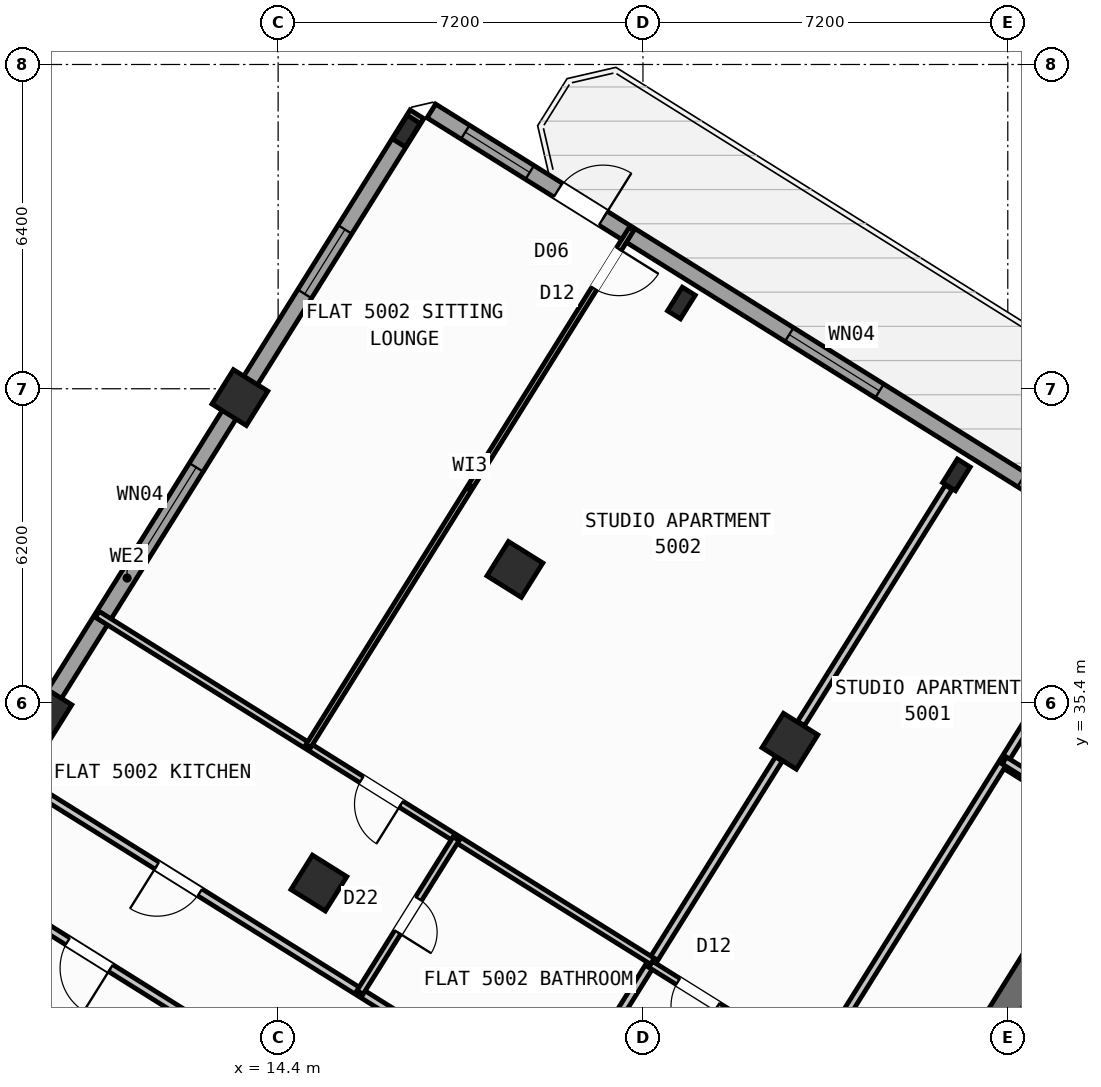
"""IFC4 building model, lengths in metres.
Left out: names, types, materials, properties, quantities, classifications, styles, units other than length and angle.
Written with IfcOpenShell. Run it as: python <this file> out.ifc"""

import sys

from ifc_helpers import new_model, si_unit, direction, frame, frame_2d, origin, origin_2d, place, context, subcontext, project, spatial, rectangle, hollow_rectangle, i_section, extrude, source, transform, mapped, element, fill, save


model = new_model("IFC4")
c1 = context("Model", 3, precision=1e-05, world=origin(), true_north=direction((0.0, 1.0)))
c2 = subcontext(c1, "Body", "Model", "MODEL_VIEW")
j1 = project(units=[si_unit("LENGTHUNIT", "METRE"), si_unit("PLANEANGLEUNIT", "RADIAN")], contexts=[c1])
p1 = place(None, origin())
s1 = spatial("IfcSite", under=j1, at=p1, CompositionType="ELEMENT")
p2 = place(p1, origin())
s2 = spatial("IfcBuilding", under=s1, at=p2, CompositionType="ELEMENT")
p3 = place(p2, frame((0.0, 0.0, 199.5)))
s3 = spatial("IfcBuildingStorey", under=s2, at=p3, CompositionType="ELEMENT", Elevation=199.5)
p4 = place(p3, frame((29.517, 30.594, 0.0), z_axis=(0.0, 0.0, 1.0), x_axis=(-0.529906864564, -0.848055844204, 0.0)))
e1 = element("IfcWall", 1, at=p4, inside=s3, PredefinedType="SHEAR", context=c2, shape_type="SweptSolid", body=[
    extrude(rectangle(XDim=3.575, YDim=0.55, at=frame_2d((1.788, 0.0))), origin(), (0.0, 0.0, 1.0), 4.25),
])
m1 = source(origin(), c2, "Body", "SweptSolid", [
    extrude(i_section(OverallWidth=0.3, OverallDepth=0.55, WebThickness=0.015, FlangeThickness=0.029, at=origin_2d()), origin(), (0.0, 0.0, 1.0), 4.5),
])
p5 = place(p3, frame((27.786, 39.901, 0.0), z_axis=(0.0, 0.0, 1.0), x_axis=(-0.848048096156, 0.529919264233, 0.0)))
e2 = element("IfcColumn", 2, at=p5, inside=s3, PredefinedType="COLUMN", context=c2, shape_type="MappedRepresentation", body=[
    mapped(m1, transform((0.0, 0.0, 0.0), scale=1.0)),
])
m2 = source(origin(), c2, "Body", "SweptSolid", [
    extrude(hollow_rectangle(XDim=0.8, YDim=0.8, WallThickness=0.032, at=origin_2d()), origin(), (0.0, 0.0, 1.0), 4.5),
])
p6 = place(p3, frame((24.5, 34.643, 0.0), z_axis=(0.0, 0.0, 1.0), x_axis=(-0.848048096156, 0.529919264233, 0.0)))
e3 = element("IfcColumn", 3, at=p6, inside=s3, PredefinedType="COLUMN", context=c2, shape_type="MappedRepresentation", body=[
    mapped(m2, transform((0.0, 0.0, 0.0), scale=1.0)),
])
p7 = place(p3, frame((22.358, 43.292, 0.0), z_axis=(0.0, 0.0, 1.0), x_axis=(-0.848048096156, 0.529919264233, 0.0)))
e4 = element("IfcColumn", 4, at=p7, inside=s3, PredefinedType="COLUMN", context=c2, shape_type="MappedRepresentation", body=[
    mapped(m1, transform((0.0, 0.0, 0.0), scale=1.0)),
])
for number, where, z_axis, x_axis in (
    (5, (19.073, 38.034, 0.0), (0.0, 0.0, 1.0), (-0.848, 0.53, 0.0)),
    (6, (15.205, 31.844, 0.0), (0.0, 0.0, 1.0), (-0.848, 0.53, 0.0)),
):
    element("IfcColumn", number, at=place(p3, frame(where, z_axis=z_axis, x_axis=x_axis)), inside=s3, PredefinedType="COLUMN", context=c2, shape_type="MappedRepresentation", body=[
        mapped(m2, transform((0.0, 0.0, 0.0), scale=1.0)),
    ])
p8 = place(p3, frame((16.931, 46.684, 0.0), z_axis=(0.0, 0.0, 1.0), x_axis=(-0.848048096156, 0.529919264233, 0.0)))
e7 = element("IfcColumn", 7, at=p8, inside=s3, PredefinedType="COLUMN", context=c2, shape_type="MappedRepresentation", body=[
    mapped(m1, transform((0.0, 0.0, 0.0), scale=1.0)),
])
for number, where, z_axis, x_axis in (
    (8, (13.646, 41.426, 0.0), (0.0, 0.0, 1.0), (-0.848, 0.53, 0.0)),
    (9, (9.777, 35.235, 0.0), (0.0, 0.0, 1.0), (-0.848, 0.53, 0.0)),
):
    element("IfcColumn", number, at=place(p3, frame(where, z_axis=z_axis, x_axis=x_axis)), inside=s3, PredefinedType="COLUMN", context=c2, shape_type="MappedRepresentation", body=[
        mapped(m2, transform((0.0, 0.0, 0.0), scale=1.0)),
    ])
p9 = place(p3, frame((5.7, 28.71, 0.0), z_axis=(0.0, 0.0, 1.0), x_axis=(0.529923711467, 0.8480453172, 0.0)))
e10 = element("IfcWall", 10, at=p9, inside=s3, PredefinedType="STANDARD", context=c2, shape_type="SweptSolid", body=[
    extrude(rectangle(XDim=21.587, YDim=0.32, at=frame_2d((10.794, 0.0))), origin(), (0.0, 0.0, 1.0), 3.725),
])
p10 = place(p9, frame((1.604, 0.0, 0.85)))
e11 = element("IfcOpeningElement", 11, at=p10, cuts=e10, PredefinedType="OPENING", context=c2, shape_type="SweptSolid", body=[
    extrude(rectangle(XDim=1.5, YDim=1.5, at=frame_2d((0.75, 0.75))), frame((0.0, 0.17, 0.0), z_axis=(0.0, -1.0, 0.0), x_axis=(1.0, 0.0, 0.0)), (0.0, 0.0, 1.0), 0.34),
])
p11 = place(p9, frame((11.269, 0.0, 0.8)))
e12 = element("IfcOpeningElement", 12, at=p11, cuts=e10, PredefinedType="OPENING", context=c2, shape_type="SweptSolid", body=[
    extrude(rectangle(XDim=2.1, YDim=1.55, at=frame_2d((1.05, 0.775))), frame((0.0, 0.17, 0.0), z_axis=(0.0, -1.0, 0.0), x_axis=(1.0, 0.0, 0.0)), (0.0, 0.0, 1.0), 0.34),
])
p12 = place(p9, frame((17.406, 0.0, 0.85)))
e13 = element("IfcOpeningElement", 13, at=p12, cuts=e10, PredefinedType="OPENING", context=c2, shape_type="SweptSolid", body=[
    extrude(rectangle(XDim=1.5, YDim=1.5, at=frame_2d((0.75, 0.75))), frame((0.0, 0.17, 0.0), z_axis=(0.0, -1.0, 0.0), x_axis=(1.0, 0.0, 0.0)), (0.0, 0.0, 1.0), 0.34),
])
p13 = place(p3, frame((17.424, 47.083, 0.0), z_axis=(0.0, 0.0, 1.0), x_axis=(0.848049927979, -0.529916332693, 0.0)))
e14 = element("IfcWall", 14, at=p13, inside=s3, PredefinedType="STANDARD", context=c2, shape_type="SweptSolid", body=[
    extrude(rectangle(XDim=29.223, YDim=0.32, at=frame_2d((14.612, 0.0))), origin(), (0.0, 0.0, 1.0), 4.25),
])
p14 = place(p13, frame((2.949, 0.0, 0.0)))
e15 = element("IfcOpeningElement", 15, at=p14, cuts=e14, PredefinedType="OPENING", context=c2, shape_type="SweptSolid", body=[
    extrude(rectangle(XDim=1.05, YDim=2.15, at=frame_2d((0.525, 1.075))), frame((0.0, 0.17, 0.0), z_axis=(0.0, -1.0, 0.0), x_axis=(1.0, 0.0, 0.0)), (0.0, 0.0, 1.0), 0.34),
])
p15 = place(p13, frame((0.789, 0.0, 0.85)))
e16 = element("IfcOpeningElement", 16, at=p15, cuts=e14, PredefinedType="OPENING", context=c2, shape_type="SweptSolid", body=[
    extrude(rectangle(XDim=1.5, YDim=1.5, at=frame_2d((0.75, 0.75))), frame((0.0, 0.17, 0.0), z_axis=(0.0, -1.0, 0.0), x_axis=(1.0, 0.0, 0.0)), (0.0, 0.0, 1.0), 0.34),
])
p16 = place(p13, frame((8.329, 0.0, 0.8)))
e17 = element("IfcOpeningElement", 17, at=p16, cuts=e14, PredefinedType="OPENING", context=c2, shape_type="SweptSolid", body=[
    extrude(rectangle(XDim=2.1, YDim=1.55, at=frame_2d((1.05, 0.775))), frame((0.0, 0.17, 0.0), z_axis=(0.0, -1.0, 0.0), x_axis=(1.0, 0.0, 0.0)), (0.0, 0.0, 1.0), 0.34),
])
p17 = place(p13, frame((13.739, 0.0, 0.85)))
e18 = element("IfcOpeningElement", 18, at=p17, cuts=e14, PredefinedType="OPENING", context=c2, shape_type="SweptSolid", body=[
    extrude(rectangle(XDim=1.5, YDim=1.5, at=frame_2d((0.75, 0.75))), frame((0.0, 0.17, 0.0), z_axis=(0.0, -1.0, 0.0), x_axis=(1.0, 0.0, 0.0)), (0.0, 0.0, 1.0), 0.34),
])
p18 = place(p13, frame((21.114, 0.0, 0.65)))
e19 = element("IfcOpeningElement", 19, at=p18, cuts=e14, PredefinedType="OPENING", context=c2, shape_type="SweptSolid", body=[
    extrude(rectangle(XDim=2.8, YDim=2.1, at=frame_2d((1.4, 1.05))), frame((0.0, 0.17, 0.0), z_axis=(0.0, -1.0, 0.0), x_axis=(1.0, 0.0, 0.0)), (0.0, 0.0, 1.0), 0.34),
])
p19 = place(p13, frame((26.784, 0.0, 0.85)))
e20 = element("IfcOpeningElement", 20, at=p19, cuts=e14, PredefinedType="OPENING", context=c2, shape_type="SweptSolid", body=[
    extrude(rectangle(XDim=1.5, YDim=1.5, at=frame_2d((0.75, 0.75))), frame((0.0, 0.17, 0.0), z_axis=(0.0, -1.0, 0.0), x_axis=(1.0, 0.0, 0.0)), (0.0, 0.0, 1.0), 0.34),
])
p20 = place(p3, frame((30.914, 32.829, 0.0), z_axis=(0.0, 0.0, 1.0), x_axis=(-0.848008813643, 0.529982124211, 0.0)))
e21 = element("IfcWall", 21, at=p20, inside=s3, PredefinedType="PARTITIONING", context=c2, shape_type="SweptSolid", body=[
    extrude(rectangle(XDim=2.61, YDim=0.16, at=frame_2d((1.305, 0.0))), origin(), (0.0, 0.0, 1.0), 4.24),
])
p21 = place(p3, frame((31.239, 38.274, 0.0), z_axis=(0.0, 0.0, 1.0), x_axis=(-0.529918877109, -0.848048338059, 0.0)))
e22 = element("IfcWall", 22, at=p21, inside=s3, PredefinedType="PARTITIONING", context=c2, shape_type="SweptSolid", body=[
    extrude(rectangle(XDim=15.35, YDim=0.16, at=frame_2d((7.675, 0.0))), origin(), (0.0, 0.0, 1.0), 4.24),
])
p22 = place(p3, frame((23.104, 25.256, 0.0), z_axis=(0.0, 0.0, 1.0), x_axis=(-0.848041752158, 0.529929416617, 0.0)))
e23 = element("IfcWall", 23, at=p22, inside=s3, PredefinedType="PARTITIONING", context=c2, shape_type="SweptSolid", body=[
    extrude(rectangle(XDim=16.73, YDim=0.16, at=frame_2d((8.365, 0.0))), origin(), (0.0, 0.0, 1.0), 4.24),
])
p23 = place(p22, frame((2.22, 0.0, 0.0)))
e24 = element("IfcOpeningElement", 24, at=p23, cuts=e23, PredefinedType="OPENING", context=c2, shape_type="SweptSolid", body=[
    extrude(rectangle(XDim=0.86, YDim=2.05, at=frame_2d((0.43, 1.025))), frame((0.0, 0.09, 0.0), z_axis=(0.0, -1.0, 0.0), x_axis=(1.0, 0.0, 0.0)), (0.0, 0.0, 1.0), 0.18),
])
p24 = place(p22, frame((12.084, 0.0, 0.0)))
e25 = element("IfcOpeningElement", 25, at=p24, cuts=e23, PredefinedType="OPENING", context=c2, shape_type="SweptSolid", body=[
    extrude(rectangle(XDim=1.0, YDim=2.1, at=frame_2d((0.5, 1.05))), frame((0.0, 0.09, 0.0), z_axis=(0.0, -1.0, 0.0), x_axis=(1.0, 0.0, 0.0)), (0.0, 0.0, 1.0), 0.18),
])
p25 = place(p3, frame((21.938, 23.391, 0.0), z_axis=(0.0, 0.0, 1.0), x_axis=(-0.848045850158, 0.529922858565, 0.0)))
e26 = element("IfcWall", 26, at=p25, inside=s3, PredefinedType="PARTITIONING", context=c2, shape_type="SweptSolid", body=[
    extrude(rectangle(XDim=16.73, YDim=0.16, at=frame_2d((8.365, 0.0))), origin(), (0.0, 0.0, 1.0), 4.24),
])
p26 = place(p25, frame((1.505, 0.0, 0.0)))
e27 = element("IfcOpeningElement", 27, at=p26, cuts=e26, PredefinedType="OPENING", context=c2, shape_type="SweptSolid", body=[
    extrude(rectangle(XDim=1.0, YDim=2.1, at=frame_2d((0.5, 1.05))), frame((0.0, 0.09, 0.0), z_axis=(0.0, -1.0, 0.0), x_axis=(1.0, 0.0, 0.0)), (0.0, 0.0, 1.0), 0.18),
])
p27 = place(p25, frame((6.435, 0.0, 0.0)))
e28 = element("IfcOpeningElement", 28, at=p27, cuts=e26, PredefinedType="OPENING", context=c2, shape_type="SweptSolid", body=[
    extrude(rectangle(XDim=1.0, YDim=2.1, at=frame_2d((0.5, 1.05))), frame((0.0, 0.09, 0.0), z_axis=(0.0, -1.0, 0.0), x_axis=(1.0, 0.0, 0.0)), (0.0, 0.0, 1.0), 0.18),
])
p28 = place(p25, frame((12.784, 0.0, 0.0)))
e29 = element("IfcOpeningElement", 29, at=p28, cuts=e26, PredefinedType="OPENING", context=c2, shape_type="SweptSolid", body=[
    extrude(rectangle(XDim=1.0, YDim=2.1, at=frame_2d((0.5, 1.05))), frame((0.0, 0.09, 0.0), z_axis=(0.0, -1.0, 0.0), x_axis=(1.0, 0.0, 0.0)), (0.0, 0.0, 1.0), 0.18),
])
p29 = place(p3, frame((27.634, 39.657, 0.0), z_axis=(0.0, 0.0, 1.0), x_axis=(-0.529899205623, -0.848060629837, 0.0)))
e30 = element("IfcWall", 30, at=p29, inside=s3, PredefinedType="PARTITIONING", context=c2, shape_type="SweptSolid", body=[
    extrude(rectangle(XDim=5.501, YDim=0.16, at=frame_2d((2.75, 0.0))), origin(), (0.0, 0.0, 1.0), 3.725),
])
p30 = place(p3, frame((24.282, 34.293, 0.0), z_axis=(0.0, 0.0, 1.0), x_axis=(-0.529934553702, -0.848038542045, 0.0)))
e31 = element("IfcWall", 31, at=p30, inside=s3, PredefinedType="PARTITIONING", context=c2, shape_type="SweptSolid", body=[
    extrude(rectangle(XDim=6.476, YDim=0.16, at=frame_2d((3.238, 0.0))), origin(), (0.0, 0.0, 1.0), 3.725),
])
p31 = place(p3, frame((24.964, 28.233, 0.0), z_axis=(0.0, 0.0, 1.0), x_axis=(-0.848059820872, 0.529900500304, 0.0)))
e32 = element("IfcWall", 32, at=p31, inside=s3, PredefinedType="PLUMBINGWALL", context=c2, shape_type="SweptSolid", body=[
    extrude(rectangle(XDim=3.79, YDim=0.14, at=frame_2d((1.895, 0.0))), origin(), (0.0, 0.0, 1.0), 4.24),
])
p32 = place(p31, frame((2.23, 0.0, 0.0)))
e33 = element("IfcOpeningElement", 33, at=p32, cuts=e32, PredefinedType="OPENING", context=c2, shape_type="SweptSolid", body=[
    extrude(rectangle(XDim=0.92, YDim=2.08, at=frame_2d((0.46, 1.04))), frame((0.0, 0.08, 0.0), z_axis=(0.0, -1.0, 0.0), x_axis=(1.0, 0.0, 0.0)), (0.0, 0.0, 1.0), 0.16),
])
p33 = place(p3, frame((21.787, 30.301, 0.0), z_axis=(0.0, 0.0, 1.0), x_axis=(-0.848043949058, 0.52992590092, 0.0)))
e34 = element("IfcWall", 34, at=p33, inside=s3, PredefinedType="PLUMBINGWALL", context=c2, shape_type="SweptSolid", body=[
    extrude(rectangle(XDim=12.92, YDim=0.14, at=frame_2d((6.46, 0.0))), origin(), (0.0, 0.0, 1.0), 4.24),
])
p34 = place(p33, frame((5.849, 0.0, 0.0)))
e35 = element("IfcOpeningElement", 35, at=p34, cuts=e34, PredefinedType="OPENING", context=c2, shape_type="SweptSolid", body=[
    extrude(rectangle(XDim=0.92, YDim=2.08, at=frame_2d((0.46, 1.04))), frame((0.0, 0.08, 0.0), z_axis=(0.0, -1.0, 0.0), x_axis=(1.0, 0.0, 0.0)), (0.0, 0.0, 1.0), 0.16),
])
p35 = place(p3, frame((17.913, 32.721, 0.0), z_axis=(0.0, 0.0, 1.0), x_axis=(-0.529906983049, -0.848055770169, 0.0)))
e36 = element("IfcWall", 36, at=p35, inside=s3, PredefinedType="PLUMBINGWALL", context=c2, shape_type="SweptSolid", body=[
    extrude(rectangle(XDim=3.58, YDim=0.14, at=frame_2d((1.79, 0.0))), origin(), (0.0, 0.0, 1.0), 4.24),
])
p36 = place(p35, frame((1.4, 0.0, 0.0)))
e37 = element("IfcOpeningElement", 37, at=p36, cuts=e36, PredefinedType="OPENING", context=c2, shape_type="SweptSolid", body=[
    extrude(rectangle(XDim=0.78, YDim=2.05, at=frame_2d((0.39, 1.025))), frame((0.0, 0.08, 0.0), z_axis=(0.0, -1.0, 0.0), x_axis=(1.0, 0.0, 0.0)), (0.0, 0.0, 1.0), 0.16),
])
p37 = place(p3, frame((21.375, 44.756, 0.0), z_axis=(0.0, 0.0, 1.0), x_axis=(-0.529905980331, -0.848056396715, 0.0)))
e38 = element("IfcWall", 38, at=p37, inside=s3, PredefinedType="PARTITIONING", context=c2, shape_type="SweptSolid", body=[
    extrude(rectangle(XDim=12.04, YDim=0.11, at=frame_2d((6.02, 0.0))), origin(), (0.0, 0.0, 1.0), 4.24),
])
p38 = place(p37, frame((0.47, 0.0, 0.0)))
e39 = element("IfcOpeningElement", 39, at=p38, cuts=e38, PredefinedType="OPENING", context=c2, shape_type="SweptSolid", body=[
    extrude(rectangle(XDim=0.92, YDim=2.08, at=frame_2d((0.46, 1.04))), frame((0.0, 0.065, 0.0), z_axis=(0.0, -1.0, 0.0), x_axis=(1.0, 0.0, 0.0)), (0.0, 0.0, 1.0), 0.13),
])
p39 = place(p3, frame((41.936, 26.012, 0.0), z_axis=(0.0, 0.0, 1.0), x_axis=(-0.848051154596, 0.529914369676, 0.0)))
e40 = element("IfcWall", 40, at=p39, inside=s3, PredefinedType="PARTITIONING", context=c2, shape_type="SweptSolid", body=[
    extrude(rectangle(XDim=15.57, YDim=0.16, at=frame_2d((7.785, 0.0))), origin(), (0.0, 0.0, 1.0), 4.24),
])
p40 = place(p39, frame((4.1, 0.0, 0.0)))
e41 = element("IfcOpeningElement", 41, at=p40, cuts=e40, PredefinedType="OPENING", context=c2, shape_type="SweptSolid", body=[
    extrude(rectangle(XDim=0.96, YDim=2.08, at=frame_2d((0.48, 1.04))), frame((0.0, 0.09, 0.0), z_axis=(0.0, -1.0, 0.0), x_axis=(1.0, 0.0, 0.0)), (0.0, 0.0, 1.0), 0.18),
])
p41 = place(p39, frame((8.2, 0.0, 0.0)))
e42 = element("IfcOpeningElement", 42, at=p41, cuts=e40, PredefinedType="OPENING", context=c2, shape_type="SweptSolid", body=[
    extrude(rectangle(XDim=1.7, YDim=2.2, at=frame_2d((0.85, 1.1))), frame((0.0, 0.09, 0.0), z_axis=(0.0, -1.0, 0.0), x_axis=(1.0, 0.0, 0.0)), (0.0, 0.0, 1.0), 0.18),
])
m3 = source(origin(), c2, "Body", "SweptSolid", [
    extrude(rectangle(XDim=1.05, YDim=2.15, at=frame_2d((0.525, 1.075))), frame((0.0, 0.025, 0.0), z_axis=(0.0, -1.0, 0.0), x_axis=(1.0, 0.0, 0.0)), (0.0, 0.0, 1.0), 0.05),
])
p42 = place(p14, origin())
e43 = element("IfcDoor", 43, at=p42, inside=s3, OperationType="SINGLE_SWING_RIGHT", PredefinedType="DOOR", context=c2, shape_type="MappedRepresentation", body=[
    mapped(m3, transform((0.0, 0.0, 0.0), scale=1.0)),
])
fill(e15, e43)
m4 = source(origin(), c2, "Body", "SweptSolid", [
    extrude(rectangle(XDim=2.1, YDim=1.55, at=frame_2d((1.05, 0.775))), frame((0.0, 0.03, 0.0), z_axis=(0.0, -1.0, 0.0), x_axis=(1.0, 0.0, 0.0)), (0.0, 0.0, 1.0), 0.06),
])
p43 = place(p11, origin())
e44 = element("IfcWindow", 44, at=p43, inside=s3, PartitioningType="SINGLE_PANEL", PredefinedType="WINDOW", context=c2, shape_type="MappedRepresentation", body=[
    mapped(m4, transform((0.0, 0.0, 0.0), scale=1.0)),
])
fill(e12, e44)
m5 = source(origin(), c2, "Body", "SweptSolid", [
    extrude(rectangle(XDim=1.5, YDim=1.5, at=frame_2d((0.75, 0.75))), frame((0.0, 0.03, 0.0), z_axis=(0.0, -1.0, 0.0), x_axis=(1.0, 0.0, 0.0)), (0.0, 0.0, 1.0), 0.06),
])
p44 = place(p12, origin())
e45 = element("IfcWindow", 45, at=p44, inside=s3, PartitioningType="SINGLE_PANEL", PredefinedType="WINDOW", context=c2, shape_type="MappedRepresentation", body=[
    mapped(m5, transform((0.0, 0.0, 0.0), scale=1.0)),
])
fill(e13, e45)
p45 = place(p15, origin())
e46 = element("IfcWindow", 46, at=p45, inside=s3, PartitioningType="SINGLE_PANEL", PredefinedType="WINDOW", context=c2, shape_type="MappedRepresentation", body=[
    mapped(m5, transform((0.0, 0.0, 0.0), scale=1.0)),
])
fill(e16, e46)
p46 = place(p16, origin())
e47 = element("IfcWindow", 47, at=p46, inside=s3, PartitioningType="SINGLE_PANEL", PredefinedType="WINDOW", context=c2, shape_type="MappedRepresentation", body=[
    mapped(m4, transform((0.0, 0.0, 0.0), scale=1.0)),
])
fill(e17, e47)
m6 = source(origin(), c2, "Body", "SweptSolid", [
    extrude(rectangle(XDim=1.0, YDim=2.1, at=frame_2d((0.5, 1.05))), frame((0.0, 0.025, 0.0), z_axis=(0.0, -1.0, 0.0), x_axis=(1.0, 0.0, 0.0)), (0.0, 0.0, 1.0), 0.05),
])
p47 = place(p28, origin())
e48 = element("IfcDoor", 48, at=p47, inside=s3, OperationType="SINGLE_SWING_LEFT", PredefinedType="DOOR", context=c2, shape_type="MappedRepresentation", body=[
    mapped(m6, transform((0.0, 0.0, 0.0), scale=1.0)),
])
fill(e29, e48)
m7 = source(origin(), c2, "Body", "SweptSolid", [
    extrude(rectangle(XDim=0.92, YDim=2.08, at=frame_2d((0.46, 1.04))), frame((0.0, 0.025, 0.0), z_axis=(0.0, -1.0, 0.0), x_axis=(1.0, 0.0, 0.0)), (0.0, 0.0, 1.0), 0.05),
])
p48 = place(p32, origin())
e49 = element("IfcDoor", 49, at=p48, inside=s3, OperationType="SINGLE_SWING_LEFT", PredefinedType="DOOR", context=c2, shape_type="MappedRepresentation", body=[
    mapped(m7, transform((0.0, 0.0, 0.0), scale=1.0)),
])
fill(e33, e49)
p49 = place(p38, origin())
e50 = element("IfcDoor", 50, at=p49, inside=s3, OperationType="SINGLE_SWING_LEFT", PredefinedType="DOOR", context=c2, shape_type="MappedRepresentation", body=[
    mapped(m7, transform((0.0, 0.0, 0.0), scale=1.0)),
])
fill(e39, e50)
p50 = place(p24, origin())
e51 = element("IfcDoor", 51, at=p50, inside=s3, OperationType="SINGLE_SWING_RIGHT", PredefinedType="DOOR", context=c2, shape_type="MappedRepresentation", body=[
    mapped(m6, transform((0.0, 0.0, 0.0), scale=1.0)),
])
fill(e25, e51)
p51 = place(p34, origin())
e52 = element("IfcDoor", 52, at=p51, inside=s3, OperationType="SINGLE_SWING_LEFT", PredefinedType="DOOR", context=c2, shape_type="MappedRepresentation", body=[
    mapped(m7, transform((0.0, 0.0, 0.0), scale=1.0)),
])
fill(e35, e52)
m8 = source(origin(), c2, "Body", "SweptSolid", [
    extrude(rectangle(XDim=0.78, YDim=2.05, at=frame_2d((0.39, 1.025))), frame((0.0, 0.025, 0.0), z_axis=(0.0, -1.0, 0.0), x_axis=(1.0, 0.0, 0.0)), (0.0, 0.0, 1.0), 0.05),
])
p52 = place(p36, origin())
e53 = element("IfcDoor", 53, at=p52, inside=s3, OperationType="SINGLE_SWING_RIGHT", PredefinedType="DOOR", context=c2, shape_type="MappedRepresentation", body=[
    mapped(m8, transform((0.0, 0.0, 0.0), scale=1.0)),
])
fill(e37, e53)
save(model, sys.argv[1])
